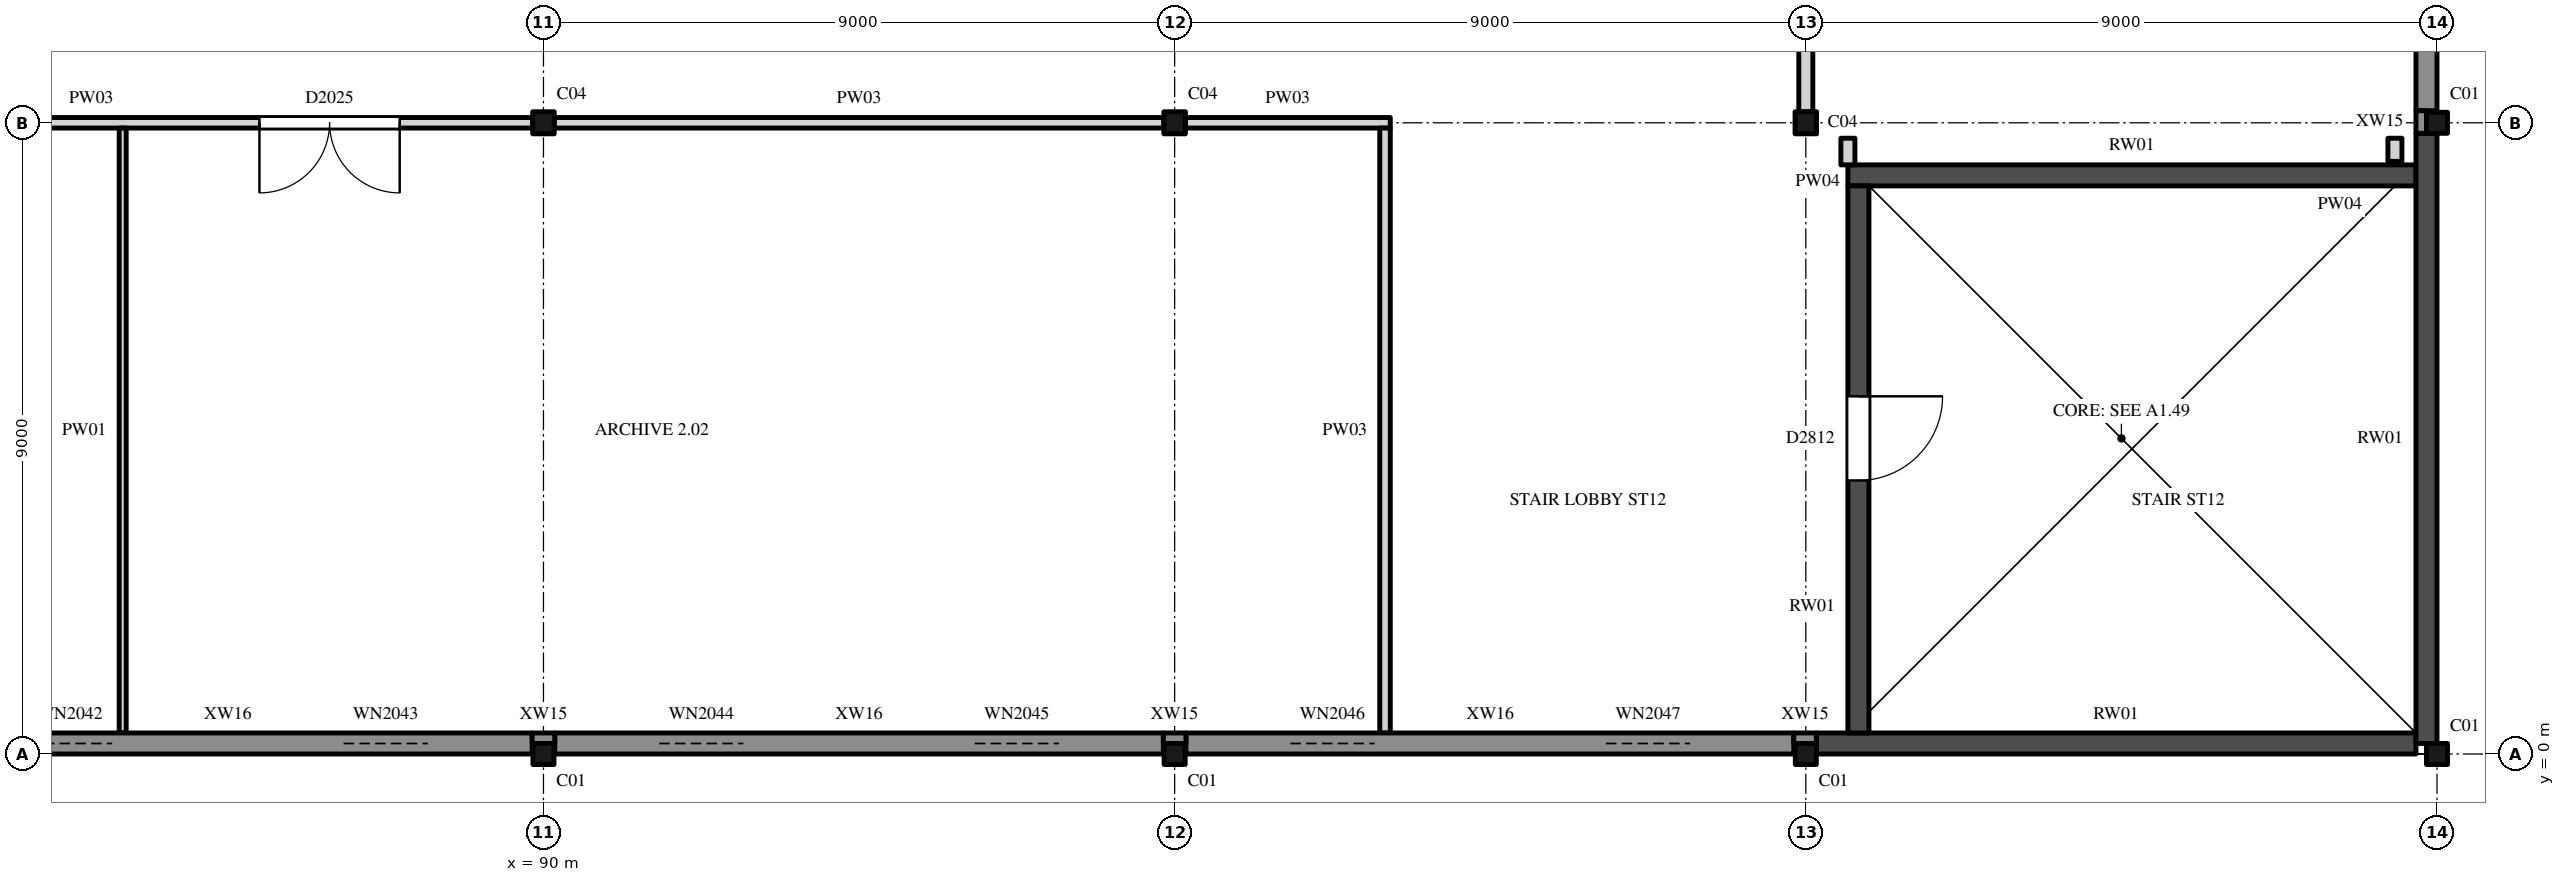
"""IFC4 building model, lengths in metres.
Left out: names, types, materials, properties, quantities, classifications, styles, units other than length and angle.
Written with IfcOpenShell. Run it as: python <this file> out.ifc"""

import sys

from ifc_helpers import new_model, si_unit, direction, frame, frame_2d, origin, origin_2d, place, context, subcontext, project, spatial, rectangle, hollow_rectangle, i_section, extrude, element, fill, save


model = new_model("IFC4")
c1 = context("Model", 3, precision=1e-05, world=origin(), true_north=direction((0.0, 1.0)))
c2 = subcontext(c1, "Body", "Model", "MODEL_VIEW")
j1 = project(units=[si_unit("LENGTHUNIT", "METRE"), si_unit("PLANEANGLEUNIT", "RADIAN")], contexts=[c1])
p1 = place(None, origin())
s1 = spatial("IfcSite", under=j1, at=p1, CompositionType="ELEMENT")
p2 = place(p1, origin())
s2 = spatial("IfcBuilding", under=s1, at=p2, CompositionType="ELEMENT")
p3 = place(p2, frame((0.0, 0.0, 11.0)))
s3 = spatial("IfcBuildingStorey", under=s2, at=p3, CompositionType="ELEMENT", Elevation=11.0)
for number, where, z_axis, x_axis in (
    (1, (90.0, 0.0, 0.0), (0.0, 0.0, 1.0), (1.0, 0.0, 0.0)),
    (2, (99.0, 0.0, 0.0), (0.0, 0.0, 1.0), (1.0, 0.0, 0.0)),
    (3, (108.0, 0.0, 0.0), (0.0, 0.0, 1.0), (1.0, 0.0, 0.0)),
    (4, (117.0, 0.0, 0.0), (0.0, 0.0, 1.0), (1.0, 0.0, 0.0)),
):
    element("IfcColumn", number, at=place(p3, frame(where, z_axis=z_axis, x_axis=x_axis)), inside=s3, PredefinedType="COLUMN", context=c2, shape_type="SweptSolid", body=[
        extrude(hollow_rectangle(XDim=0.3, YDim=0.3, WallThickness=0.012, InnerFilletRadius=0.019, OuterFilletRadius=0.031, at=origin_2d()), origin(), (0.0, 0.0, 1.0), 5.0),
    ])
for number, where, z_axis, x_axis in (
    (5, (90.0, 9.0, 0.0), (0.0, 0.0, 1.0), (1.0, 0.0, 0.0)),
    (6, (99.0, 9.0, 0.0), (0.0, 0.0, 1.0), (1.0, 0.0, 0.0)),
    (7, (108.0, 9.0, 0.0), (0.0, 0.0, 1.0), (1.0, 0.0, 0.0)),
):
    element("IfcColumn", number, at=place(p3, frame(where, z_axis=z_axis, x_axis=x_axis)), inside=s3, PredefinedType="COLUMN", context=c2, shape_type="SweptSolid", body=[
        extrude(i_section(OverallWidth=0.307, OverallDepth=0.315, WebThickness=0.012, FlangeThickness=0.019, FilletRadius=0.017, at=origin_2d()), origin(), (0.0, 0.0, 1.0), 5.0),
    ])
p4 = place(p3, frame((117.0, 9.0, 0.0), z_axis=(0.0, 0.0, 1.0), x_axis=(1.0, 0.0, 0.0)))
e8 = element("IfcColumn", 8, at=p4, inside=s3, PredefinedType="COLUMN", context=c2, shape_type="SweptSolid", body=[
    extrude(hollow_rectangle(XDim=0.3, YDim=0.3, WallThickness=0.012, InnerFilletRadius=0.019, OuterFilletRadius=0.031, at=origin_2d()), origin(), (0.0, 0.0, 1.0), 5.0),
])
p5 = place(p3, frame((108.15, 0.15, 0.0), z_axis=(0.0, 0.0, 1.0), x_axis=(1.0, 0.0, 0.0)))
e9 = element("IfcWall", 9, at=p5, inside=s3, PredefinedType="SHEAR", context=c2, shape_type="SweptSolid", body=[
    extrude(rectangle(XDim=8.55, YDim=0.3, at=frame_2d((4.275, 0.0))), origin(), (0.0, 0.0, 1.0), 4.825),
])
p6 = place(p3, frame((108.6, 8.25, 0.0), z_axis=(0.0, 0.0, 1.0), x_axis=(1.0, 0.0, 0.0)))
e10 = element("IfcWall", 10, at=p6, inside=s3, PredefinedType="SHEAR", context=c2, shape_type="SweptSolid", body=[
    extrude(rectangle(XDim=8.1, YDim=0.3, at=frame_2d((4.05, 0.0))), origin(), (0.0, 0.0, 1.0), 4.825),
])
p7 = place(p3, frame((108.75, 0.3, 0.0), z_axis=(0.0, 0.0, 1.0), x_axis=(0.0, 1.0, 0.0)))
e11 = element("IfcWall", 11, at=p7, inside=s3, PredefinedType="SHEAR", context=c2, shape_type="SweptSolid", body=[
    extrude(rectangle(XDim=7.8, YDim=0.3, at=frame_2d((3.9, 0.0))), origin(), (0.0, 0.0, 1.0), 4.825),
])
p8 = place(p7, frame((3.6, 0.0, 0.0)))
e12 = element("IfcOpeningElement", 12, at=p8, cuts=e11, PredefinedType="OPENING", context=c2, shape_type="SweptSolid", body=[
    extrude(rectangle(XDim=1.2, YDim=2.1, at=frame_2d((0.6, 1.05))), frame((0.0, 0.16, 0.0), z_axis=(0.0, -1.0, 0.0), x_axis=(1.0, 0.0, 0.0)), (0.0, 0.0, 1.0), 0.32),
])
p9 = place(p3, frame((116.85, 0.15, 0.0), z_axis=(0.0, 0.0, 1.0), x_axis=(0.0, 1.0, 0.0)))
e13 = element("IfcWall", 13, at=p9, inside=s3, PredefinedType="SHEAR", context=c2, shape_type="SweptSolid", body=[
    extrude(rectangle(XDim=8.7, YDim=0.3, at=frame_2d((4.35, 0.0))), origin(), (0.0, 0.0, 1.0), 4.825),
])
p10 = place(p3, frame((81.161, 0.15, 0.0), z_axis=(0.0, 0.0, 1.0), x_axis=(1.0, 0.0, 0.0)))
e14 = element("IfcWall", 14, at=p10, inside=s3, PredefinedType="SOLIDWALL", context=c2, shape_type="SweptSolid", body=[
    extrude(rectangle(XDim=8.678, YDim=0.3, at=frame_2d((4.339, 0.0))), origin(), (0.0, 0.0, 1.0), 4.825),
])
p11 = place(p10, frame((1.489, 0.0, 1.2)))
e15 = element("IfcOpeningElement", 15, at=p11, cuts=e14, PredefinedType="OPENING", context=c2, shape_type="SweptSolid", body=[
    extrude(rectangle(XDim=1.2, YDim=1.5, at=frame_2d((0.6, 0.75))), frame((0.0, 0.16, 0.0), z_axis=(0.0, -1.0, 0.0), x_axis=(1.0, 0.0, 0.0)), (0.0, 0.0, 1.0), 0.32),
])
p12 = place(p10, frame((5.989, 0.0, 1.2)))
e16 = element("IfcOpeningElement", 16, at=p12, cuts=e14, PredefinedType="OPENING", context=c2, shape_type="SweptSolid", body=[
    extrude(rectangle(XDim=1.2, YDim=1.5, at=frame_2d((0.6, 0.75))), frame((0.0, 0.16, 0.0), z_axis=(0.0, -1.0, 0.0), x_axis=(1.0, 0.0, 0.0)), (0.0, 0.0, 1.0), 0.32),
])
p13 = place(p3, frame((90.161, 0.15, 0.0), z_axis=(0.0, 0.0, 1.0), x_axis=(1.0, 0.0, 0.0)))
e17 = element("IfcWall", 17, at=p13, inside=s3, PredefinedType="SOLIDWALL", context=c2, shape_type="SweptSolid", body=[
    extrude(rectangle(XDim=8.678, YDim=0.3, at=frame_2d((4.339, 0.0))), origin(), (0.0, 0.0, 1.0), 4.825),
])
p14 = place(p13, frame((1.489, 0.0, 1.2)))
e18 = element("IfcOpeningElement", 18, at=p14, cuts=e17, PredefinedType="OPENING", context=c2, shape_type="SweptSolid", body=[
    extrude(rectangle(XDim=1.2, YDim=1.5, at=frame_2d((0.6, 0.75))), frame((0.0, 0.16, 0.0), z_axis=(0.0, -1.0, 0.0), x_axis=(1.0, 0.0, 0.0)), (0.0, 0.0, 1.0), 0.32),
])
p15 = place(p13, frame((5.989, 0.0, 1.2)))
e19 = element("IfcOpeningElement", 19, at=p15, cuts=e17, PredefinedType="OPENING", context=c2, shape_type="SweptSolid", body=[
    extrude(rectangle(XDim=1.2, YDim=1.5, at=frame_2d((0.6, 0.75))), frame((0.0, 0.16, 0.0), z_axis=(0.0, -1.0, 0.0), x_axis=(1.0, 0.0, 0.0)), (0.0, 0.0, 1.0), 0.32),
])
p16 = place(p3, frame((99.161, 0.15, 0.0), z_axis=(0.0, 0.0, 1.0), x_axis=(1.0, 0.0, 0.0)))
e20 = element("IfcWall", 20, at=p16, inside=s3, PredefinedType="SOLIDWALL", context=c2, shape_type="SweptSolid", body=[
    extrude(rectangle(XDim=8.667, YDim=0.3, at=frame_2d((4.333, 0.0))), origin(), (0.0, 0.0, 1.0), 4.825),
])
p17 = place(p16, frame((1.489, 0.0, 1.2)))
e21 = element("IfcOpeningElement", 21, at=p17, cuts=e20, PredefinedType="OPENING", context=c2, shape_type="SweptSolid", body=[
    extrude(rectangle(XDim=1.2, YDim=1.5, at=frame_2d((0.6, 0.75))), frame((0.0, 0.16, 0.0), z_axis=(0.0, -1.0, 0.0), x_axis=(1.0, 0.0, 0.0)), (0.0, 0.0, 1.0), 0.32),
])
p18 = place(p16, frame((5.989, 0.0, 1.2)))
e22 = element("IfcOpeningElement", 22, at=p18, cuts=e20, PredefinedType="OPENING", context=c2, shape_type="SweptSolid", body=[
    extrude(rectangle(XDim=1.2, YDim=1.5, at=frame_2d((0.6, 0.75))), frame((0.0, 0.16, 0.0), z_axis=(0.0, -1.0, 0.0), x_axis=(1.0, 0.0, 0.0)), (0.0, 0.0, 1.0), 0.32),
])
p19 = place(p3, frame((116.85, 9.172, 0.0), z_axis=(0.0, 0.0, 1.0), x_axis=(0.0, 1.0, 0.0)))
e23 = element("IfcWall", 23, at=p19, inside=s3, PredefinedType="SOLIDWALL", context=c2, shape_type="SweptSolid", body=[
    extrude(rectangle(XDim=8.667, YDim=0.3, at=frame_2d((4.333, 0.0))), origin(), (0.0, 0.0, 1.0), 4.825),
])
p20 = place(p19, frame((3.128, 0.0, 0.9)))
e24 = element("IfcOpeningElement", 24, at=p20, cuts=e23, PredefinedType="OPENING", context=c2, shape_type="SweptSolid", body=[
    extrude(rectangle(XDim=2.4, YDim=1.8, at=frame_2d((1.2, 0.9))), frame((0.0, 0.16, 0.0), z_axis=(0.0, -1.0, 0.0), x_axis=(1.0, 0.0, 0.0)), (0.0, 0.0, 1.0), 0.32),
])
for number, where, z_axis, x_axis in (
    (25, (89.839, 0.225, 0.0), (0.0, 0.0, 1.0), (1.0, 0.0, 0.0)),
    (26, (98.839, 0.225, 0.0), (0.0, 0.0, 1.0), (1.0, 0.0, 0.0)),
):
    element("IfcWall", number, at=place(p3, frame(where, z_axis=z_axis, x_axis=x_axis)), inside=s3, PredefinedType="SOLIDWALL", context=c2, shape_type="SweptSolid", body=[
        extrude(rectangle(XDim=0.322, YDim=0.15, at=frame_2d((0.161, 0.0))), origin(), (0.0, 0.0, 1.0), 4.825),
    ])
for number, where, z_axis, x_axis in (
    (27, (107.828, 0.225, 0.0), (0.0, 0.0, 1.0), (1.0, 0.0, 0.0)),
    (28, (116.775, 8.85, 0.0), (0.0, 0.0, 1.0), (0.0, 1.0, 0.0)),
):
    element("IfcWall", number, at=place(p3, frame(where, z_axis=z_axis, x_axis=x_axis)), inside=s3, PredefinedType="SOLIDWALL", context=c2, shape_type="SweptSolid", body=[
        extrude(rectangle(XDim=0.322, YDim=0.15, at=frame_2d((0.161, 0.0))), origin(), (0.0, 0.0, 1.0), 4.825),
    ])
for number, where, z_axis, x_axis in (
    (29, (82.5, 2.325, 5.0), (0.0, 0.0, 1.0), (1.0, 0.0, 0.0)),
    (30, (82.5, 6.675, 5.0), (0.0, 0.0, 1.0), (1.0, 0.0, 0.0)),
):
    element("IfcWall", number, at=place(p3, frame(where, z_axis=z_axis, x_axis=x_axis)), inside=s3, PredefinedType="PARAPET", context=c2, shape_type="SweptSolid", body=[
        extrude(rectangle(XDim=6.0, YDim=0.15, at=frame_2d((3.0, 0.0))), origin(), (0.0, 0.0, 1.0), 0.5),
    ])
p21 = place(p3, frame((88.425, 2.4, 5.0), z_axis=(0.0, 0.0, 1.0), x_axis=(0.0, 1.0, 0.0)))
e31 = element("IfcWall", 31, at=p21, inside=s3, PredefinedType="PARAPET", context=c2, shape_type="SweptSolid", body=[
    extrude(rectangle(XDim=4.2, YDim=0.15, at=frame_2d((2.1, 0.0))), origin(), (0.0, 0.0, 1.0), 0.5),
])
for number, where, z_axis, x_axis in (
    (32, (91.5, 2.325, 5.0), (0.0, 0.0, 1.0), (1.0, 0.0, 0.0)),
    (33, (91.5, 6.675, 5.0), (0.0, 0.0, 1.0), (1.0, 0.0, 0.0)),
):
    element("IfcWall", number, at=place(p3, frame(where, z_axis=z_axis, x_axis=x_axis)), inside=s3, PredefinedType="PARAPET", context=c2, shape_type="SweptSolid", body=[
        extrude(rectangle(XDim=6.0, YDim=0.15, at=frame_2d((3.0, 0.0))), origin(), (0.0, 0.0, 1.0), 0.5),
    ])
for number, where, z_axis, x_axis in (
    (34, (91.575, 2.4, 5.0), (0.0, 0.0, 1.0), (0.0, 1.0, 0.0)),
    (35, (97.425, 2.4, 5.0), (0.0, 0.0, 1.0), (0.0, 1.0, 0.0)),
):
    element("IfcWall", number, at=place(p3, frame(where, z_axis=z_axis, x_axis=x_axis)), inside=s3, PredefinedType="PARAPET", context=c2, shape_type="SweptSolid", body=[
        extrude(rectangle(XDim=4.2, YDim=0.15, at=frame_2d((2.1, 0.0))), origin(), (0.0, 0.0, 1.0), 0.5),
    ])
for number, where, z_axis, x_axis in (
    (36, (100.5, 2.325, 5.0), (0.0, 0.0, 1.0), (1.0, 0.0, 0.0)),
    (37, (100.5, 6.675, 5.0), (0.0, 0.0, 1.0), (1.0, 0.0, 0.0)),
):
    element("IfcWall", number, at=place(p3, frame(where, z_axis=z_axis, x_axis=x_axis)), inside=s3, PredefinedType="PARAPET", context=c2, shape_type="SweptSolid", body=[
        extrude(rectangle(XDim=6.0, YDim=0.15, at=frame_2d((3.0, 0.0))), origin(), (0.0, 0.0, 1.0), 0.5),
    ])
for number, where, z_axis, x_axis in (
    (38, (100.575, 2.4, 5.0), (0.0, 0.0, 1.0), (0.0, 1.0, 0.0)),
    (39, (106.425, 2.4, 5.0), (0.0, 0.0, 1.0), (0.0, 1.0, 0.0)),
):
    element("IfcWall", number, at=place(p3, frame(where, z_axis=z_axis, x_axis=x_axis)), inside=s3, PredefinedType="PARAPET", context=c2, shape_type="SweptSolid", body=[
        extrude(rectangle(XDim=4.2, YDim=0.15, at=frame_2d((2.1, 0.0))), origin(), (0.0, 0.0, 1.0), 0.5),
    ])
for number, where, z_axis, x_axis in (
    (40, (109.5, 2.325, 5.0), (0.0, 0.0, 1.0), (1.0, 0.0, 0.0)),
    (41, (109.5, 6.675, 5.0), (0.0, 0.0, 1.0), (1.0, 0.0, 0.0)),
):
    element("IfcWall", number, at=place(p3, frame(where, z_axis=z_axis, x_axis=x_axis)), inside=s3, PredefinedType="PARAPET", context=c2, shape_type="SweptSolid", body=[
        extrude(rectangle(XDim=6.0, YDim=0.15, at=frame_2d((3.0, 0.0))), origin(), (0.0, 0.0, 1.0), 0.5),
    ])
for number, where, z_axis, x_axis in (
    (42, (109.575, 2.4, 5.0), (0.0, 0.0, 1.0), (0.0, 1.0, 0.0)),
    (43, (115.425, 2.4, 5.0), (0.0, 0.0, 1.0), (0.0, 1.0, 0.0)),
):
    element("IfcWall", number, at=place(p3, frame(where, z_axis=z_axis, x_axis=x_axis)), inside=s3, PredefinedType="PARAPET", context=c2, shape_type="SweptSolid", body=[
        extrude(rectangle(XDim=4.2, YDim=0.15, at=frame_2d((2.1, 0.0))), origin(), (0.0, 0.0, 1.0), 0.5),
    ])
p22 = place(p3, frame((81.154, 9.0, 0.0), z_axis=(0.0, 0.0, 1.0), x_axis=(1.0, 0.0, 0.0)))
e44 = element("IfcWall", 44, at=p22, inside=s3, PredefinedType="PARTITIONING", context=c2, shape_type="SweptSolid", body=[
    extrude(rectangle(XDim=8.693, YDim=0.15, at=frame_2d((4.346, 0.0))), origin(), (0.0, 0.0, 1.0), 4.419),
])
p23 = place(p22, frame((4.796, 0.0, 0.0)))
e45 = element("IfcOpeningElement", 45, at=p23, cuts=e44, PredefinedType="OPENING", context=c2, shape_type="SweptSolid", body=[
    extrude(rectangle(XDim=2.0, YDim=2.4, at=frame_2d((1.0, 1.2))), frame((0.0, 0.085, 0.0), z_axis=(0.0, -1.0, 0.0), x_axis=(1.0, 0.0, 0.0)), (0.0, 0.0, 1.0), 0.17),
])
p24 = place(p3, frame((90.154, 9.0, 0.0), z_axis=(0.0, 0.0, 1.0), x_axis=(1.0, 0.0, 0.0)))
e46 = element("IfcWall", 46, at=p24, inside=s3, PredefinedType="PARTITIONING", context=c2, shape_type="SweptSolid", body=[
    extrude(rectangle(XDim=8.693, YDim=0.15, at=frame_2d((4.346, 0.0))), origin(), (0.0, 0.0, 1.0), 4.419),
])
p25 = place(p3, frame((99.154, 9.0, 0.0), z_axis=(0.0, 0.0, 1.0), x_axis=(1.0, 0.0, 0.0)))
e47 = element("IfcWall", 47, at=p25, inside=s3, PredefinedType="PARTITIONING", context=c2, shape_type="SweptSolid", body=[
    extrude(rectangle(XDim=2.921, YDim=0.15, at=frame_2d((1.461, 0.0))), origin(), (0.0, 0.0, 1.0), 4.419),
])
p26 = place(p3, frame((84.0, 0.3, 0.0), z_axis=(0.0, 0.0, 1.0), x_axis=(0.0, 1.0, 0.0)))
e48 = element("IfcWall", 48, at=p26, inside=s3, PredefinedType="PARTITIONING", context=c2, shape_type="SweptSolid", body=[
    extrude(rectangle(XDim=8.625, YDim=0.1, at=frame_2d((4.312, 0.0))), origin(), (0.0, 0.0, 1.0), 4.825),
])
p27 = place(p3, frame((102.0, 0.3, 0.0), z_axis=(0.0, 0.0, 1.0), x_axis=(0.0, 1.0, 0.0)))
e49 = element("IfcWall", 49, at=p27, inside=s3, PredefinedType="PARTITIONING", context=c2, shape_type="SweptSolid", body=[
    extrude(rectangle(XDim=8.625, YDim=0.15, at=frame_2d((4.312, 0.0))), origin(), (0.0, 0.0, 1.0), 4.825),
])
p28 = place(p3, frame((108.0, 9.157, 0.0), z_axis=(0.0, 0.0, 1.0), x_axis=(0.0, 1.0, 0.0)))
e50 = element("IfcWall", 50, at=p28, inside=s3, PredefinedType="PARTITIONING", context=c2, shape_type="SweptSolid", body=[
    extrude(rectangle(XDim=8.686, YDim=0.2, at=frame_2d((4.343, 0.0))), origin(), (0.0, 0.0, 1.0), 4.297),
])
p29 = place(p28, frame((3.55, 0.0, 0.0)))
e51 = element("IfcOpeningElement", 51, at=p29, cuts=e50, PredefinedType="OPENING", context=c2, shape_type="SweptSolid", body=[
    extrude(rectangle(XDim=1.5, YDim=2.4, at=frame_2d((0.75, 1.2))), frame((0.0, 0.11, 0.0), z_axis=(0.0, -1.0, 0.0), x_axis=(1.0, 0.0, 0.0)), (0.0, 0.0, 1.0), 0.22),
])
p30 = place(p3, frame((108.6, 8.4, 0.0), z_axis=(0.0, 0.0, 1.0), x_axis=(0.0, 1.0, 0.0)))
e52 = element("IfcWall", 52, at=p30, inside=s3, PredefinedType="PARTITIONING", context=c2, shape_type="SweptSolid", body=[
    extrude(rectangle(XDim=0.38, YDim=0.2, at=frame_2d((0.19, 0.0))), origin(), (0.0, 0.0, 1.0), 4.825),
])
p31 = place(p3, frame((116.4, 8.45, 0.0), z_axis=(0.0, 0.0, 1.0), x_axis=(0.0, 1.0, 0.0)))
e53 = element("IfcWall", 53, at=p31, inside=s3, PredefinedType="PARTITIONING", context=c2, shape_type="SweptSolid", body=[
    extrude(rectangle(XDim=0.33, YDim=0.2, at=frame_2d((0.165, 0.0))), origin(), (0.0, 0.0, 1.0), 4.825),
])
p32 = place(p8, origin())
e54 = element("IfcDoor", 54, at=p32, inside=s3, OperationType="SINGLE_SWING_RIGHT", PredefinedType="DOOR", context=c2, shape_type="SweptSolid", body=[
    extrude(rectangle(XDim=1.2, YDim=2.1, at=frame_2d((0.6, 1.05))), frame((0.0, 0.025, 0.0), z_axis=(0.0, -1.0, 0.0), x_axis=(1.0, 0.0, 0.0)), (0.0, 0.0, 1.0), 0.05),
])
fill(e12, e54)
p33 = place(p11, origin())
e55 = element("IfcWindow", 55, at=p33, inside=s3, PartitioningType="SINGLE_PANEL", PredefinedType="WINDOW", context=c2, shape_type="SweptSolid", body=[
    extrude(rectangle(XDim=1.2, YDim=1.5, at=frame_2d((0.6, 0.75))), frame((0.0, 0.03, 0.0), z_axis=(0.0, -1.0, 0.0), x_axis=(1.0, 0.0, 0.0)), (0.0, 0.0, 1.0), 0.06),
])
fill(e15, e55)
p34 = place(p12, origin())
e56 = element("IfcWindow", 56, at=p34, inside=s3, PartitioningType="SINGLE_PANEL", PredefinedType="WINDOW", context=c2, shape_type="SweptSolid", body=[
    extrude(rectangle(XDim=1.2, YDim=1.5, at=frame_2d((0.6, 0.75))), frame((0.0, 0.03, 0.0), z_axis=(0.0, -1.0, 0.0), x_axis=(1.0, 0.0, 0.0)), (0.0, 0.0, 1.0), 0.06),
])
fill(e16, e56)
p35 = place(p14, origin())
e57 = element("IfcWindow", 57, at=p35, inside=s3, PartitioningType="SINGLE_PANEL", PredefinedType="WINDOW", context=c2, shape_type="SweptSolid", body=[
    extrude(rectangle(XDim=1.2, YDim=1.5, at=frame_2d((0.6, 0.75))), frame((0.0, 0.03, 0.0), z_axis=(0.0, -1.0, 0.0), x_axis=(1.0, 0.0, 0.0)), (0.0, 0.0, 1.0), 0.06),
])
fill(e18, e57)
p36 = place(p15, origin())
e58 = element("IfcWindow", 58, at=p36, inside=s3, PartitioningType="SINGLE_PANEL", PredefinedType="WINDOW", context=c2, shape_type="SweptSolid", body=[
    extrude(rectangle(XDim=1.2, YDim=1.5, at=frame_2d((0.6, 0.75))), frame((0.0, 0.03, 0.0), z_axis=(0.0, -1.0, 0.0), x_axis=(1.0, 0.0, 0.0)), (0.0, 0.0, 1.0), 0.06),
])
fill(e19, e58)
p37 = place(p17, origin())
e59 = element("IfcWindow", 59, at=p37, inside=s3, PartitioningType="SINGLE_PANEL", PredefinedType="WINDOW", context=c2, shape_type="SweptSolid", body=[
    extrude(rectangle(XDim=1.2, YDim=1.5, at=frame_2d((0.6, 0.75))), frame((0.0, 0.03, 0.0), z_axis=(0.0, -1.0, 0.0), x_axis=(1.0, 0.0, 0.0)), (0.0, 0.0, 1.0), 0.06),
])
fill(e21, e59)
p38 = place(p18, origin())
e60 = element("IfcWindow", 60, at=p38, inside=s3, PartitioningType="SINGLE_PANEL", PredefinedType="WINDOW", context=c2, shape_type="SweptSolid", body=[
    extrude(rectangle(XDim=1.2, YDim=1.5, at=frame_2d((0.6, 0.75))), frame((0.0, 0.03, 0.0), z_axis=(0.0, -1.0, 0.0), x_axis=(1.0, 0.0, 0.0)), (0.0, 0.0, 1.0), 0.06),
])
fill(e22, e60)
p39 = place(p23, origin())
e61 = element("IfcDoor", 61, at=p39, inside=s3, OperationType="DOUBLE_DOOR_SINGLE_SWING", PredefinedType="DOOR", context=c2, shape_type="SweptSolid", body=[
    extrude(rectangle(XDim=2.0, YDim=2.4, at=frame_2d((1.0, 1.2))), frame((0.0, 0.025, 0.0), z_axis=(0.0, -1.0, 0.0), x_axis=(1.0, 0.0, 0.0)), (0.0, 0.0, 1.0), 0.05),
])
fill(e45, e61)
save(model, sys.argv[1])
